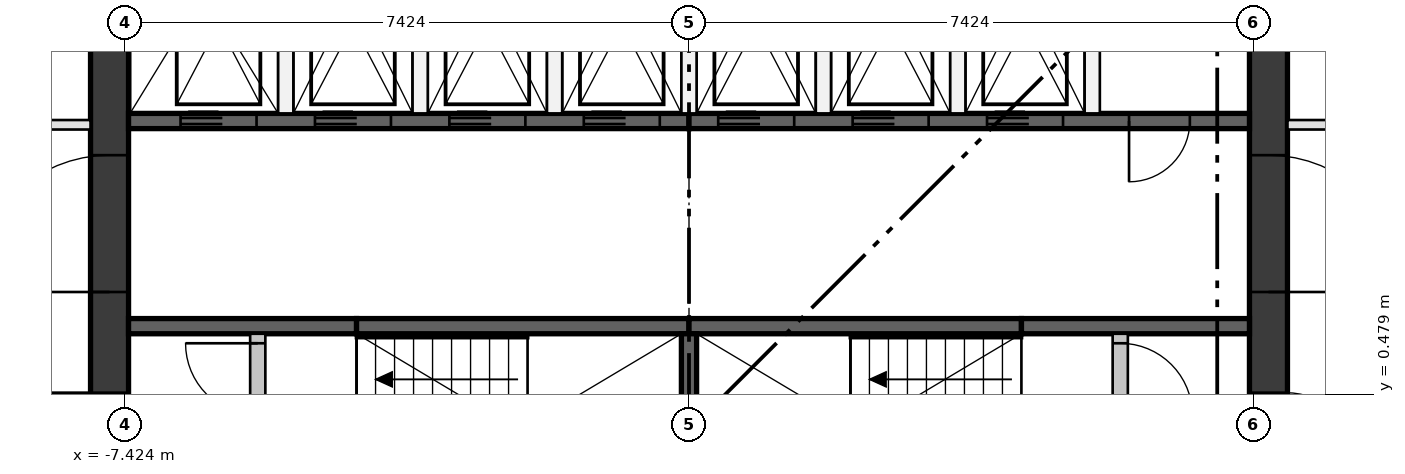
"""IFC4 building model, lengths in metres.
Left out: names, types, materials, properties, quantities, classifications, styles, units other than length and angle.
Written with IfcOpenShell. Run it as: python <this file> out.ifc"""

import sys

from ifc_helpers import new_model, si_unit, direction, frame, frame_2d, origin, place, context, subcontext, project, spatial, rectangle, extrude, element, fill, save


model = new_model("IFC4")
c1 = context("Model", 3, precision=1e-05, world=origin(), true_north=direction((0.0, 1.0)))
c2 = subcontext(c1, "Body", "Model", "MODEL_VIEW")
j1 = project(units=[si_unit("LENGTHUNIT", "METRE"), si_unit("PLANEANGLEUNIT", "RADIAN")], contexts=[c1])
p1 = place(None, origin())
s1 = spatial("IfcSite", under=j1, at=p1, CompositionType="ELEMENT")
p2 = place(p1, origin())
s2 = spatial("IfcBuilding", under=s1, at=p2, CompositionType="ELEMENT")
p3 = place(p2, frame((0.0, 0.0, 184.3)))
s3 = spatial("IfcBuildingStorey", under=s2, at=p3, CompositionType="ELEMENT", Elevation=184.3)
p4 = place(p3, frame((-7.624, -7.374, 0.0), z_axis=(0.0, 0.0, 1.0), x_axis=(0.0, 1.0, 0.0)))
e1 = element("IfcWall", 1, at=p4, inside=s3, PredefinedType="SHEAR", context=c2, shape_type="SweptSolid", body=[
    extrude(rectangle(XDim=14.748, YDim=0.5, at=frame_2d((7.374, 0.0))), origin(), (0.0, 0.0, 1.0), 3.35),
])
p5 = place(p4, frame((6.874, 0.0, 0.0)))
e2 = element("IfcOpeningElement", 2, at=p5, cuts=e1, PredefinedType="OPENING", context=c2, shape_type="SweptSolid", body=[
    extrude(rectangle(XDim=1.0, YDim=2.1, at=frame_2d((0.5, 1.05))), frame((0.0, 0.26, 0.0), z_axis=(0.0, -1.0, 0.0), x_axis=(1.0, 0.0, 0.0)), (0.0, 0.0, 1.0), 0.52),
])
p6 = place(p4, frame((3.75, 0.0, 0.0)))
e3 = element("IfcOpeningElement", 3, at=p6, cuts=e1, PredefinedType="OPENING", context=c2, shape_type="SweptSolid", body=[
    extrude(rectangle(XDim=1.8, YDim=2.1, at=frame_2d((0.9, 1.05))), frame((0.0, 0.26, 0.0), z_axis=(0.0, -1.0, 0.0), x_axis=(1.0, 0.0, 0.0)), (0.0, 0.0, 1.0), 0.52),
])
p7 = place(p4, frame((9.198, 0.0, 0.0)))
e4 = element("IfcOpeningElement", 4, at=p7, cuts=e1, PredefinedType="OPENING", context=c2, shape_type="SweptSolid", body=[
    extrude(rectangle(XDim=1.8, YDim=2.1, at=frame_2d((0.9, 1.05))), frame((0.0, 0.26, 0.0), z_axis=(0.0, -1.0, 0.0), x_axis=(1.0, 0.0, 0.0)), (0.0, 0.0, 1.0), 0.52),
])
p8 = place(p3, frame((7.624, -7.374, 0.0), z_axis=(0.0, 0.0, 1.0), x_axis=(0.0, 1.0, 0.0)))
e5 = element("IfcWall", 5, at=p8, inside=s3, PredefinedType="SHEAR", context=c2, shape_type="SweptSolid", body=[
    extrude(rectangle(XDim=14.748, YDim=0.5, at=frame_2d((7.374, 0.0))), origin(), (0.0, 0.0, 1.0), 3.35),
])
p9 = place(p8, frame((6.874, 0.0, 0.0)))
e6 = element("IfcOpeningElement", 6, at=p9, cuts=e5, PredefinedType="OPENING", context=c2, shape_type="SweptSolid", body=[
    extrude(rectangle(XDim=1.0, YDim=2.1, at=frame_2d((0.5, 1.05))), frame((0.0, 0.26, 0.0), z_axis=(0.0, -1.0, 0.0), x_axis=(1.0, 0.0, 0.0)), (0.0, 0.0, 1.0), 0.52),
])
p10 = place(p8, frame((3.75, 0.0, 0.0)))
e7 = element("IfcOpeningElement", 7, at=p10, cuts=e5, PredefinedType="OPENING", context=c2, shape_type="SweptSolid", body=[
    extrude(rectangle(XDim=1.8, YDim=2.1, at=frame_2d((0.9, 1.05))), frame((0.0, 0.26, 0.0), z_axis=(0.0, -1.0, 0.0), x_axis=(1.0, 0.0, 0.0)), (0.0, 0.0, 1.0), 0.52),
])
p11 = place(p8, frame((9.198, 0.0, 0.0)))
e8 = element("IfcOpeningElement", 8, at=p11, cuts=e5, PredefinedType="OPENING", context=c2, shape_type="SweptSolid", body=[
    extrude(rectangle(XDim=1.8, YDim=2.1, at=frame_2d((0.9, 1.05))), frame((0.0, 0.26, 0.0), z_axis=(0.0, -1.0, 0.0), x_axis=(1.0, 0.0, 0.0)), (0.0, 0.0, 1.0), 0.52),
])
p12 = place(p3, frame((-7.374, 4.074, 0.0), z_axis=(0.0, 0.0, 1.0), x_axis=(1.0, 0.0, 0.0)))
e9 = element("IfcWall", 9, at=p12, inside=s3, PredefinedType="SHEAR", context=c2, shape_type="SweptSolid", body=[
    extrude(rectangle(XDim=7.374, YDim=0.2, at=frame_2d((3.687, 0.0))), origin(), (0.0, 0.0, 1.0), 3.0),
])
p13 = place(p12, frame((0.684, 0.0, 0.0)))
e10 = element("IfcOpeningElement", 10, at=p13, cuts=e9, PredefinedType="OPENING", context=c2, shape_type="SweptSolid", body=[
    extrude(rectangle(XDim=1.0, YDim=2.1, at=frame_2d((0.5, 1.05))), frame((0.0, 0.11, 0.0), z_axis=(0.0, -1.0, 0.0), x_axis=(1.0, 0.0, 0.0)), (0.0, 0.0, 1.0), 0.22),
])
p14 = place(p12, frame((2.453, 0.0, 0.0)))
e11 = element("IfcOpeningElement", 11, at=p14, cuts=e9, PredefinedType="OPENING", context=c2, shape_type="SweptSolid", body=[
    extrude(rectangle(XDim=1.0, YDim=2.1, at=frame_2d((0.5, 1.05))), frame((0.0, 0.11, 0.0), z_axis=(0.0, -1.0, 0.0), x_axis=(1.0, 0.0, 0.0)), (0.0, 0.0, 1.0), 0.22),
])
p15 = place(p12, frame((4.221, 0.0, 0.0)))
e12 = element("IfcOpeningElement", 12, at=p15, cuts=e9, PredefinedType="OPENING", context=c2, shape_type="SweptSolid", body=[
    extrude(rectangle(XDim=1.0, YDim=2.1, at=frame_2d((0.5, 1.05))), frame((0.0, 0.11, 0.0), z_axis=(0.0, -1.0, 0.0), x_axis=(1.0, 0.0, 0.0)), (0.0, 0.0, 1.0), 0.22),
])
p16 = place(p12, frame((5.99, 0.0, 0.0)))
e13 = element("IfcOpeningElement", 13, at=p16, cuts=e9, PredefinedType="OPENING", context=c2, shape_type="SweptSolid", body=[
    extrude(rectangle(XDim=1.0, YDim=2.1, at=frame_2d((0.5, 1.05))), frame((0.0, 0.11, 0.0), z_axis=(0.0, -1.0, 0.0), x_axis=(1.0, 0.0, 0.0)), (0.0, 0.0, 1.0), 0.22),
])
p17 = place(p3, frame((0.0, 4.074, 0.0), z_axis=(0.0, 0.0, 1.0), x_axis=(1.0, 0.0, 0.0)))
e14 = element("IfcWall", 14, at=p17, inside=s3, PredefinedType="SHEAR", context=c2, shape_type="SweptSolid", body=[
    extrude(rectangle(XDim=7.374, YDim=0.2, at=frame_2d((3.687, 0.0))), origin(), (0.0, 0.0, 1.0), 3.0),
])
p18 = place(p17, frame((0.384, 0.0, 0.0)))
e15 = element("IfcOpeningElement", 15, at=p18, cuts=e14, PredefinedType="OPENING", context=c2, shape_type="SweptSolid", body=[
    extrude(rectangle(XDim=1.0, YDim=2.1, at=frame_2d((0.5, 1.05))), frame((0.0, 0.11, 0.0), z_axis=(0.0, -1.0, 0.0), x_axis=(1.0, 0.0, 0.0)), (0.0, 0.0, 1.0), 0.22),
])
p19 = place(p17, frame((2.153, 0.0, 0.0)))
e16 = element("IfcOpeningElement", 16, at=p19, cuts=e14, PredefinedType="OPENING", context=c2, shape_type="SweptSolid", body=[
    extrude(rectangle(XDim=1.0, YDim=2.1, at=frame_2d((0.5, 1.05))), frame((0.0, 0.11, 0.0), z_axis=(0.0, -1.0, 0.0), x_axis=(1.0, 0.0, 0.0)), (0.0, 0.0, 1.0), 0.22),
])
p20 = place(p17, frame((3.921, 0.0, 0.0)))
e17 = element("IfcOpeningElement", 17, at=p20, cuts=e14, PredefinedType="OPENING", context=c2, shape_type="SweptSolid", body=[
    extrude(rectangle(XDim=1.0, YDim=2.1, at=frame_2d((0.5, 1.05))), frame((0.0, 0.11, 0.0), z_axis=(0.0, -1.0, 0.0), x_axis=(1.0, 0.0, 0.0)), (0.0, 0.0, 1.0), 0.22),
])
p21 = place(p17, frame((5.79, 0.0, 0.0)))
e18 = element("IfcOpeningElement", 18, at=p21, cuts=e14, PredefinedType="OPENING", context=c2, shape_type="SweptSolid", body=[
    extrude(rectangle(XDim=0.8, YDim=2.1, at=frame_2d((0.4, 1.05))), frame((0.0, 0.11, 0.0), z_axis=(0.0, -1.0, 0.0), x_axis=(1.0, 0.0, 0.0)), (0.0, 0.0, 1.0), 0.22),
])
p22 = place(p3, frame((-7.374, 1.375, 0.0), z_axis=(0.0, 0.0, 1.0), x_axis=(1.0, 0.0, 0.0)))
e19 = element("IfcWall", 19, at=p22, inside=s3, PredefinedType="SHEAR", context=c2, shape_type="SweptSolid", body=[
    extrude(rectangle(XDim=3.0, YDim=0.2, at=frame_2d((1.5, 0.0))), origin(), (0.0, 0.0, 1.0), 3.0),
])
for number, where, z_axis, x_axis in (
    (20, (-4.374, 1.375, 0.0), (0.0, 0.0, 1.0), (1.0, 0.0, 0.0)),
    (21, (0.0, 1.375, 0.0), (0.0, 0.0, 1.0), (1.0, 0.0, 0.0)),
):
    element("IfcWall", number, at=place(p3, frame(where, z_axis=z_axis, x_axis=x_axis)), inside=s3, PredefinedType="SHEAR", context=c2, shape_type="SweptSolid", body=[
        extrude(rectangle(XDim=4.374, YDim=0.2, at=frame_2d((2.187, 0.0))), origin(), (0.0, 0.0, 1.0), 3.0),
    ])
p23 = place(p3, frame((4.374, 1.375, 0.0), z_axis=(0.0, 0.0, 1.0), x_axis=(1.0, 0.0, 0.0)))
e22 = element("IfcWall", 22, at=p23, inside=s3, PredefinedType="SHEAR", context=c2, shape_type="SweptSolid", body=[
    extrude(rectangle(XDim=3.0, YDim=0.2, at=frame_2d((1.5, 0.0))), origin(), (0.0, 0.0, 1.0), 3.0),
])
p24 = place(p3, frame((0.0, -1.275, 0.0), z_axis=(0.0, 0.0, 1.0), x_axis=(0.0, 1.0, 0.0)))
e23 = element("IfcWall", 23, at=p24, inside=s3, PredefinedType="SHEAR", context=c2, shape_type="SweptSolid", body=[
    extrude(rectangle(XDim=2.55, YDim=0.2, at=frame_2d((1.275, 0.0))), origin(), (0.0, 0.0, 1.0), 3.0),
])
for number, where, z_axis, x_axis in (
    (24, (-5.305, 4.174, 0.0), (0.0, 0.0, 1.0), (0.0, 1.0, 0.0)),
    (25, (-3.537, 4.174, 0.0), (0.0, 0.0, 1.0), (0.0, 1.0, 0.0)),
    (26, (-1.769, 4.174, 0.0), (0.0, 0.0, 1.0), (0.0, 1.0, 0.0)),
    (27, (0.0, 4.174, 0.0), (0.0, 0.0, 1.0), (0.0, 1.0, 0.0)),
    (28, (1.769, 4.174, 0.0), (0.0, 0.0, 1.0), (0.0, 1.0, 0.0)),
    (29, (3.537, 4.174, 0.0), (0.0, 0.0, 1.0), (0.0, 1.0, 0.0)),
    (30, (5.305, 4.174, 0.0), (0.0, 0.0, 1.0), (0.0, 1.0, 0.0)),
):
    element("IfcWall", number, at=place(p3, frame(where, z_axis=z_axis, x_axis=x_axis)), inside=s3, PredefinedType="PARTITIONING", context=c2, shape_type="SweptSolid", body=[
        extrude(rectangle(XDim=3.2, YDim=0.2, at=frame_2d((1.6, 0.0))), origin(), (0.0, 0.0, 1.0), 3.0),
    ])
p25 = place(p3, frame((-5.674, -1.275, 0.0), z_axis=(0.0, 0.0, 1.0), x_axis=(0.0, 1.0, 0.0)))
e31 = element("IfcWall", 31, at=p25, inside=s3, PredefinedType="PARTITIONING", context=c2, shape_type="SweptSolid", body=[
    extrude(rectangle(XDim=2.55, YDim=0.2, at=frame_2d((1.275, 0.0))), origin(), (0.0, 0.0, 1.0), 3.0),
])
p26 = place(p25, frame((0.125, 0.0, 0.0)))
e32 = element("IfcOpeningElement", 32, at=p26, cuts=e31, PredefinedType="OPENING", context=c2, shape_type="SweptSolid", body=[
    extrude(rectangle(XDim=0.95, YDim=2.1, at=frame_2d((0.475, 1.05))), frame((0.0, 0.11, 0.0), z_axis=(0.0, -1.0, 0.0), x_axis=(1.0, 0.0, 0.0)), (0.0, 0.0, 1.0), 0.22),
])
p27 = place(p25, frame((1.475, 0.0, 0.0)))
e33 = element("IfcOpeningElement", 33, at=p27, cuts=e31, PredefinedType="OPENING", context=c2, shape_type="SweptSolid", body=[
    extrude(rectangle(XDim=0.95, YDim=2.1, at=frame_2d((0.475, 1.05))), frame((0.0, 0.11, 0.0), z_axis=(0.0, -1.0, 0.0), x_axis=(1.0, 0.0, 0.0)), (0.0, 0.0, 1.0), 0.22),
])
p28 = place(p3, frame((5.674, -1.275, 0.0), z_axis=(0.0, 0.0, 1.0), x_axis=(0.0, 1.0, 0.0)))
e34 = element("IfcWall", 34, at=p28, inside=s3, PredefinedType="PARTITIONING", context=c2, shape_type="SweptSolid", body=[
    extrude(rectangle(XDim=2.55, YDim=0.2, at=frame_2d((1.275, 0.0))), origin(), (0.0, 0.0, 1.0), 3.0),
])
p29 = place(p28, frame((0.125, 0.0, 0.0)))
e35 = element("IfcOpeningElement", 35, at=p29, cuts=e34, PredefinedType="OPENING", context=c2, shape_type="SweptSolid", body=[
    extrude(rectangle(XDim=0.95, YDim=2.1, at=frame_2d((0.475, 1.05))), frame((0.0, 0.11, 0.0), z_axis=(0.0, -1.0, 0.0), x_axis=(1.0, 0.0, 0.0)), (0.0, 0.0, 1.0), 0.22),
])
p30 = place(p28, frame((1.475, 0.0, 0.0)))
e36 = element("IfcOpeningElement", 36, at=p30, cuts=e34, PredefinedType="OPENING", context=c2, shape_type="SweptSolid", body=[
    extrude(rectangle(XDim=0.95, YDim=2.1, at=frame_2d((0.475, 1.05))), frame((0.0, 0.11, 0.0), z_axis=(0.0, -1.0, 0.0), x_axis=(1.0, 0.0, 0.0)), (0.0, 0.0, 1.0), 0.22),
])
p31 = place(p3, frame((7.874, 4.024, 0.0), z_axis=(0.0, 0.0, 1.0), x_axis=(1.0, 0.0, 0.0)))
e37 = element("IfcWall", 37, at=p31, inside=s3, PredefinedType="PARTITIONING", context=c2, shape_type="SweptSolid", body=[
    extrude(rectangle(XDim=5.921, YDim=0.125, at=frame_2d((2.96, 0.0))), origin(), (0.0, 0.0, 1.0), 3.0),
])
p32 = place(p31, frame((2.5, 0.0, 0.0)))
e38 = element("IfcOpeningElement", 38, at=p32, cuts=e37, PredefinedType="OPENING", context=c2, shape_type="SweptSolid", body=[
    extrude(rectangle(XDim=1.0, YDim=2.1, at=frame_2d((0.5, 1.05))), frame((0.0, 0.073, 0.0), z_axis=(0.0, -1.0, 0.0), x_axis=(1.0, 0.0, 0.0)), (0.0, 0.0, 1.0), 0.145),
])
p33 = place(p3, frame((-13.373, 4.024, 0.0), z_axis=(0.0, 0.0, 1.0), x_axis=(1.0, 0.0, 0.0)))
e39 = element("IfcWall", 39, at=p33, inside=s3, PredefinedType="PARTITIONING", context=c2, shape_type="SweptSolid", body=[
    extrude(rectangle(XDim=5.499, YDim=0.125, at=frame_2d((2.75, 0.0))), origin(), (0.0, 0.0, 1.0), 3.0),
])
p34 = place(p33, frame((2.2, 0.0, 0.0)))
e40 = element("IfcOpeningElement", 40, at=p34, cuts=e39, PredefinedType="OPENING", context=c2, shape_type="SweptSolid", body=[
    extrude(rectangle(XDim=1.0, YDim=2.1, at=frame_2d((0.5, 1.05))), frame((0.0, 0.073, 0.0), z_axis=(0.0, -1.0, 0.0), x_axis=(1.0, 0.0, 0.0)), (0.0, 0.0, 1.0), 0.145),
])
p35 = place(p13, frame((1.0, 0.0, 0.0), z_axis=(0.0, 0.0, 1.0), x_axis=(-1.0, 0.0, 0.0)))
e41 = element("IfcDoor", 41, at=p35, inside=s3, OperationType="DOUBLE_DOOR_SLIDING", PredefinedType="DOOR", context=c2, shape_type="SweptSolid", body=[
    extrude(rectangle(XDim=1.0, YDim=2.1, at=frame_2d((0.5, 1.05))), frame((0.0, 0.025, 0.0), z_axis=(0.0, -1.0, 0.0), x_axis=(1.0, 0.0, 0.0)), (0.0, 0.0, 1.0), 0.05),
])
fill(e10, e41)
p36 = place(p14, frame((1.0, 0.0, 0.0), z_axis=(0.0, 0.0, 1.0), x_axis=(-1.0, 0.0, 0.0)))
e42 = element("IfcDoor", 42, at=p36, inside=s3, OperationType="DOUBLE_DOOR_SLIDING", PredefinedType="DOOR", context=c2, shape_type="SweptSolid", body=[
    extrude(rectangle(XDim=1.0, YDim=2.1, at=frame_2d((0.5, 1.05))), frame((0.0, 0.025, 0.0), z_axis=(0.0, -1.0, 0.0), x_axis=(1.0, 0.0, 0.0)), (0.0, 0.0, 1.0), 0.05),
])
fill(e11, e42)
p37 = place(p15, frame((1.0, 0.0, 0.0), z_axis=(0.0, 0.0, 1.0), x_axis=(-1.0, 0.0, 0.0)))
e43 = element("IfcDoor", 43, at=p37, inside=s3, OperationType="DOUBLE_DOOR_SLIDING", PredefinedType="DOOR", context=c2, shape_type="SweptSolid", body=[
    extrude(rectangle(XDim=1.0, YDim=2.1, at=frame_2d((0.5, 1.05))), frame((0.0, 0.025, 0.0), z_axis=(0.0, -1.0, 0.0), x_axis=(1.0, 0.0, 0.0)), (0.0, 0.0, 1.0), 0.05),
])
fill(e12, e43)
p38 = place(p16, frame((1.0, 0.0, 0.0), z_axis=(0.0, 0.0, 1.0), x_axis=(-1.0, 0.0, 0.0)))
e44 = element("IfcDoor", 44, at=p38, inside=s3, OperationType="DOUBLE_DOOR_SLIDING", PredefinedType="DOOR", context=c2, shape_type="SweptSolid", body=[
    extrude(rectangle(XDim=1.0, YDim=2.1, at=frame_2d((0.5, 1.05))), frame((0.0, 0.025, 0.0), z_axis=(0.0, -1.0, 0.0), x_axis=(1.0, 0.0, 0.0)), (0.0, 0.0, 1.0), 0.05),
])
fill(e13, e44)
p39 = place(p18, frame((1.0, 0.0, 0.0), z_axis=(0.0, 0.0, 1.0), x_axis=(-1.0, 0.0, 0.0)))
e45 = element("IfcDoor", 45, at=p39, inside=s3, OperationType="DOUBLE_DOOR_SLIDING", PredefinedType="DOOR", context=c2, shape_type="SweptSolid", body=[
    extrude(rectangle(XDim=1.0, YDim=2.1, at=frame_2d((0.5, 1.05))), frame((0.0, 0.025, 0.0), z_axis=(0.0, -1.0, 0.0), x_axis=(1.0, 0.0, 0.0)), (0.0, 0.0, 1.0), 0.05),
])
fill(e15, e45)
p40 = place(p19, frame((1.0, 0.0, 0.0), z_axis=(0.0, 0.0, 1.0), x_axis=(-1.0, 0.0, 0.0)))
e46 = element("IfcDoor", 46, at=p40, inside=s3, OperationType="DOUBLE_DOOR_SLIDING", PredefinedType="DOOR", context=c2, shape_type="SweptSolid", body=[
    extrude(rectangle(XDim=1.0, YDim=2.1, at=frame_2d((0.5, 1.05))), frame((0.0, 0.025, 0.0), z_axis=(0.0, -1.0, 0.0), x_axis=(1.0, 0.0, 0.0)), (0.0, 0.0, 1.0), 0.05),
])
fill(e16, e46)
p41 = place(p20, frame((1.0, 0.0, 0.0), z_axis=(0.0, 0.0, 1.0), x_axis=(-1.0, 0.0, 0.0)))
e47 = element("IfcDoor", 47, at=p41, inside=s3, OperationType="DOUBLE_DOOR_SLIDING", PredefinedType="DOOR", context=c2, shape_type="SweptSolid", body=[
    extrude(rectangle(XDim=1.0, YDim=2.1, at=frame_2d((0.5, 1.05))), frame((0.0, 0.025, 0.0), z_axis=(0.0, -1.0, 0.0), x_axis=(1.0, 0.0, 0.0)), (0.0, 0.0, 1.0), 0.05),
])
fill(e17, e47)
p42 = place(p27, origin())
e48 = element("IfcDoor", 48, at=p42, inside=s3, OperationType="SINGLE_SWING_RIGHT", PredefinedType="DOOR", context=c2, shape_type="SweptSolid", body=[
    extrude(rectangle(XDim=0.95, YDim=2.1, at=frame_2d((0.475, 1.05))), frame((0.0, 0.025, 0.0), z_axis=(0.0, -1.0, 0.0), x_axis=(1.0, 0.0, 0.0)), (0.0, 0.0, 1.0), 0.05),
])
fill(e33, e48)
p43 = place(p30, frame((0.95, 0.0, 0.0), z_axis=(0.0, 0.0, 1.0), x_axis=(-1.0, 0.0, 0.0)))
e49 = element("IfcDoor", 49, at=p43, inside=s3, OperationType="SINGLE_SWING_LEFT", PredefinedType="DOOR", context=c2, shape_type="SweptSolid", body=[
    extrude(rectangle(XDim=0.95, YDim=2.1, at=frame_2d((0.475, 1.05))), frame((0.0, 0.025, 0.0), z_axis=(0.0, -1.0, 0.0), x_axis=(1.0, 0.0, 0.0)), (0.0, 0.0, 1.0), 0.05),
])
fill(e36, e49)
p44 = place(p21, frame((0.8, 0.0, 0.0), z_axis=(0.0, 0.0, 1.0), x_axis=(-1.0, 0.0, 0.0)))
e50 = element("IfcDoor", 50, at=p44, inside=s3, OperationType="SINGLE_SWING_LEFT", PredefinedType="DOOR", context=c2, shape_type="SweptSolid", body=[
    extrude(rectangle(XDim=0.8, YDim=2.1, at=frame_2d((0.4, 1.05))), frame((0.0, 0.025, 0.0), z_axis=(0.0, -1.0, 0.0), x_axis=(1.0, 0.0, 0.0)), (0.0, 0.0, 1.0), 0.05),
])
fill(e18, e50)
p45 = place(p5, origin())
e51 = element("IfcDoor", 51, at=p45, inside=s3, OperationType="SINGLE_SWING_RIGHT", PredefinedType="DOOR", context=c2, shape_type="SweptSolid", body=[
    extrude(rectangle(XDim=1.0, YDim=2.1, at=frame_2d((0.5, 1.05))), frame((0.0, 0.25, 0.0), z_axis=(0.0, -1.0, 0.0), x_axis=(1.0, 0.0, 0.0)), (0.0, 0.0, 1.0), 0.05),
])
fill(e2, e51)
p46 = place(p7, origin())
e52 = element("IfcDoor", 52, at=p46, inside=s3, OperationType="DOUBLE_DOOR_SINGLE_SWING", PredefinedType="DOOR", context=c2, shape_type="SweptSolid", body=[
    extrude(rectangle(XDim=1.8, YDim=2.1, at=frame_2d((0.9, 1.05))), frame((0.0, 0.025, 0.0), z_axis=(0.0, -1.0, 0.0), x_axis=(1.0, 0.0, 0.0)), (0.0, 0.0, 1.0), 0.05),
])
fill(e4, e52)
p47 = place(p9, frame((1.0, 0.0, 0.0), z_axis=(0.0, 0.0, 1.0), x_axis=(-1.0, 0.0, 0.0)))
e53 = element("IfcDoor", 53, at=p47, inside=s3, OperationType="SINGLE_SWING_LEFT", PredefinedType="DOOR", context=c2, shape_type="SweptSolid", body=[
    extrude(rectangle(XDim=1.0, YDim=2.1, at=frame_2d((0.5, 1.05))), frame((0.0, 0.25, 0.0), z_axis=(0.0, -1.0, 0.0), x_axis=(1.0, 0.0, 0.0)), (0.0, 0.0, 1.0), 0.05),
])
fill(e6, e53)
p48 = place(p11, frame((1.8, 0.0, 0.0), z_axis=(0.0, 0.0, 1.0), x_axis=(-1.0, 0.0, 0.0)))
e54 = element("IfcDoor", 54, at=p48, inside=s3, OperationType="DOUBLE_DOOR_SINGLE_SWING", PredefinedType="DOOR", context=c2, shape_type="SweptSolid", body=[
    extrude(rectangle(XDim=1.8, YDim=2.1, at=frame_2d((0.9, 1.05))), frame((0.0, 0.025, 0.0), z_axis=(0.0, -1.0, 0.0), x_axis=(1.0, 0.0, 0.0)), (0.0, 0.0, 1.0), 0.05),
])
fill(e8, e54)
save(model, sys.argv[1])
